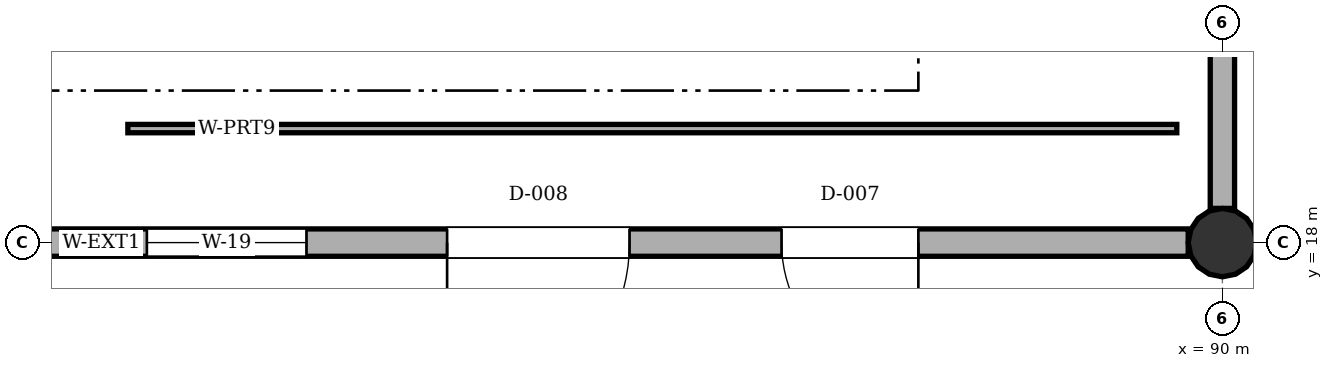
"""IFC4 building model, lengths in metres.
Left out: names, types, materials, properties, quantities, classifications, styles, units other than length and angle.
Written with IfcOpenShell. Run it as: python <this file> out.ifc"""

import sys

from ifc_helpers import new_model, si_unit, direction, frame, frame_2d, origin, origin_2d, place, context, subcontext, project, spatial, rectangle, circle, extrude, element, fill, save


model = new_model("IFC4")
c1 = context("Model", 3, precision=1e-05, world=origin(), true_north=direction((0.0, 1.0)))
c2 = subcontext(c1, "Body", "Model", "MODEL_VIEW")
j1 = project(units=[si_unit("LENGTHUNIT", "METRE"), si_unit("PLANEANGLEUNIT", "RADIAN")], contexts=[c1])
p1 = place(None, origin())
s1 = spatial("IfcSite", under=j1, at=p1, CompositionType="ELEMENT")
p2 = place(p1, origin())
s2 = spatial("IfcBuilding", under=s1, at=p2, CompositionType="ELEMENT")
p3 = place(p2, origin())
s3 = spatial("IfcBuildingStorey", under=s2, at=p3, CompositionType="ELEMENT", Elevation=0.0)
p4 = place(p3, frame((90.0, 18.0, 0.0), z_axis=(0.0, 0.0, 1.0), x_axis=(1.0, 0.0, 0.0)))
e1 = element("IfcColumn", 1, at=p4, inside=s3, PredefinedType="COLUMN", context=c2, shape_type="SweptSolid", body=[
    extrude(circle(Radius=0.45, at=origin_2d()), origin(), (0.0, 0.0, 1.0), 6.6),
])
p5 = place(p3, frame((89.55, 18.0, 0.0), z_axis=(0.0, 0.0, 1.0), x_axis=(-1.0, 0.0, 0.0)))
e2 = element("IfcWall", 2, at=p5, inside=s3, PredefinedType="SOLIDWALL", context=c2, shape_type="SweptSolid", body=[
    extrude(rectangle(XDim=17.1, YDim=0.36, at=frame_2d((8.55, 0.0))), origin(), (0.0, 0.0, 1.0), 5.595),
])
p6 = place(p5, frame((3.55, 0.0, 0.0)))
e3 = element("IfcOpeningElement", 3, at=p6, cuts=e2, PredefinedType="OPENING", context=c2, shape_type="SweptSolid", body=[
    extrude(rectangle(XDim=1.8, YDim=2.35, at=frame_2d((0.9, 1.175))), frame((0.0, 0.19, 0.0), z_axis=(0.0, -1.0, 0.0), x_axis=(1.0, 0.0, 0.0)), (0.0, 0.0, 1.0), 0.38),
])
p7 = place(p5, frame((7.35, 0.0, 0.0)))
e4 = element("IfcOpeningElement", 4, at=p7, cuts=e2, PredefinedType="OPENING", context=c2, shape_type="SweptSolid", body=[
    extrude(rectangle(XDim=2.4, YDim=2.5, at=frame_2d((1.2, 1.25))), frame((0.0, 0.19, 0.0), z_axis=(0.0, -1.0, 0.0), x_axis=(1.0, 0.0, 0.0)), (0.0, 0.0, 1.0), 0.38),
])
p8 = place(p5, frame((11.6, 0.0, 0.95)))
e5 = element("IfcOpeningElement", 5, at=p8, cuts=e2, PredefinedType="OPENING", context=c2, shape_type="SweptSolid", body=[
    extrude(rectangle(XDim=2.1, YDim=2.0, at=frame_2d((1.05, 1.0))), frame((0.0, 0.19, 0.0), z_axis=(0.0, -1.0, 0.0), x_axis=(1.0, 0.0, 0.0)), (0.0, 0.0, 1.0), 0.38),
])
p9 = place(p3, frame((90.0, 29.55, 0.0), z_axis=(0.0, 0.0, 1.0), x_axis=(0.0, -1.0, 0.0)))
e6 = element("IfcWall", 6, at=p9, inside=s3, PredefinedType="SOLIDWALL", context=c2, shape_type="SweptSolid", body=[
    extrude(rectangle(XDim=11.1, YDim=0.32, at=frame_2d((5.55, 0.0))), origin(), (0.0, 0.0, 1.0), 5.595),
])
p10 = place(p9, frame((2.617, 0.0, 0.0)))
e7 = element("IfcOpeningElement", 7, at=p10, cuts=e6, PredefinedType="OPENING", context=c2, shape_type="SweptSolid", body=[
    extrude(rectangle(XDim=2.4, YDim=2.5, at=frame_2d((1.2, 1.25))), frame((0.0, 0.17, 0.0), z_axis=(0.0, -1.0, 0.0), x_axis=(1.0, 0.0, 0.0)), (0.0, 0.0, 1.0), 0.34),
])
p11 = place(p9, frame((6.383, 0.0, 0.95)))
e8 = element("IfcOpeningElement", 8, at=p11, cuts=e6, PredefinedType="OPENING", context=c2, shape_type="SweptSolid", body=[
    extrude(rectangle(XDim=1.8, YDim=2.0, at=frame_2d((0.9, 1.0))), frame((0.0, 0.17, 0.0), z_axis=(0.0, -1.0, 0.0), x_axis=(1.0, 0.0, 0.0)), (0.0, 0.0, 1.0), 0.34),
])
p12 = place(p3, frame((75.6, 19.5, 0.0), z_axis=(0.0, 0.0, 1.0), x_axis=(1.0, 0.0, 0.0)))
e9 = element("IfcWall", 9, at=p12, inside=s3, PredefinedType="PARTITIONING", context=c2, shape_type="SweptSolid", body=[
    extrude(rectangle(XDim=13.8, YDim=0.11, at=frame_2d((6.9, 0.0))), origin(), (0.0, 0.0, 1.0), 4.4),
])
p13 = place(p6, origin())
e10 = element("IfcDoor", 10, at=p13, inside=s3, OperationType="SINGLE_SWING_LEFT", PredefinedType="DOOR", context=c2, shape_type="SweptSolid", body=[
    extrude(rectangle(XDim=1.8, YDim=2.35, at=frame_2d((0.9, 1.175))), frame((0.0, 0.025, 0.0), z_axis=(0.0, -1.0, 0.0), x_axis=(1.0, 0.0, 0.0)), (0.0, 0.0, 1.0), 0.05),
])
fill(e3, e10)
p14 = place(p7, origin())
e11 = element("IfcDoor", 11, at=p14, inside=s3, OperationType="SINGLE_SWING_RIGHT", PredefinedType="DOOR", context=c2, shape_type="SweptSolid", body=[
    extrude(rectangle(XDim=2.4, YDim=2.5, at=frame_2d((1.2, 1.25))), frame((0.0, 0.025, 0.0), z_axis=(0.0, -1.0, 0.0), x_axis=(1.0, 0.0, 0.0)), (0.0, 0.0, 1.0), 0.05),
])
fill(e4, e11)
p15 = place(p8, origin())
e12 = element("IfcWindow", 12, at=p15, inside=s3, PartitioningType="SINGLE_PANEL", PredefinedType="WINDOW", context=c2, shape_type="SweptSolid", body=[
    extrude(rectangle(XDim=2.1, YDim=2.0, at=frame_2d((1.05, 1.0))), frame((0.0, 0.03, 0.0), z_axis=(0.0, -1.0, 0.0), x_axis=(1.0, 0.0, 0.0)), (0.0, 0.0, 1.0), 0.06),
])
fill(e5, e12)
save(model, sys.argv[1])
